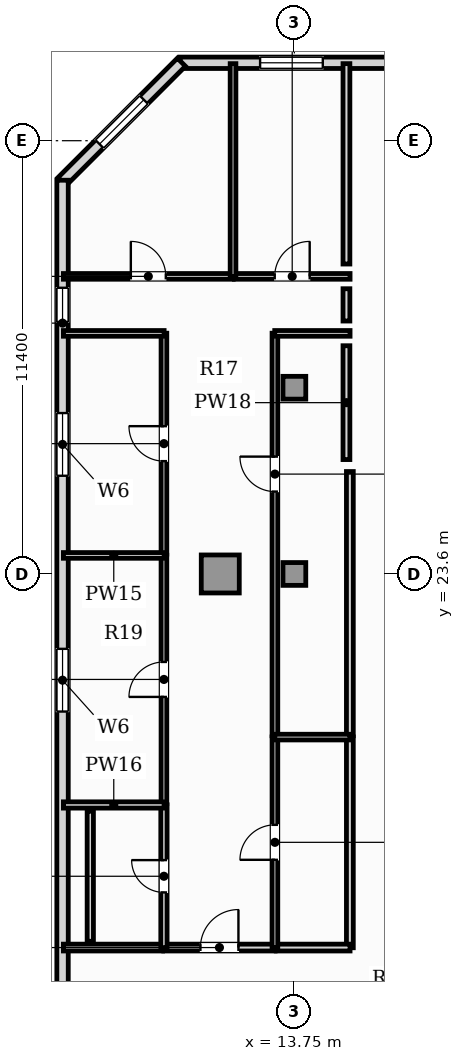
"""IFC4 building model, lengths in metres.
Left out: names, types, materials, properties, quantities, classifications, styles, units other than length and angle.
Written with IfcOpenShell. Run it as: python <this file> out.ifc"""

import sys

from ifc_helpers import new_model, si_unit, direction, frame, frame_2d, origin, origin_2d, place, context, subcontext, project, spatial, rectangle, hollow_rectangle, extrude, element, fill, save


model = new_model("IFC4")
c1 = context("Model", 3, precision=1e-05, world=origin(), true_north=direction((0.0, 1.0)))
c2 = subcontext(c1, "Body", "Model", "MODEL_VIEW")
j1 = project(units=[si_unit("LENGTHUNIT", "METRE"), si_unit("PLANEANGLEUNIT", "RADIAN")], contexts=[c1])
p1 = place(None, origin())
s1 = spatial("IfcSite", under=j1, at=p1, CompositionType="ELEMENT")
p2 = place(p1, origin())
s2 = spatial("IfcBuilding", under=s1, at=p2, CompositionType="ELEMENT")
p3 = place(p2, frame((0.0, 0.0, 231.1)))
s3 = spatial("IfcBuildingStorey", under=s2, at=p3, CompositionType="ELEMENT", Elevation=231.1)
p4 = place(p3, frame((11.8, 23.6, 0.0), z_axis=(0.0, 0.0, 1.0), x_axis=(1.0, 0.0, 0.0)))
e1 = element("IfcColumn", 1, at=p4, inside=s3, PredefinedType="USERDEFINED", context=c2, shape_type="SweptSolid", body=[
    extrude(hollow_rectangle(XDim=1.0, YDim=1.0, WallThickness=0.06, at=origin_2d()), origin(), (0.0, 0.0, 1.0), 3.85),
])
for number, where, z_axis, x_axis in (
    (2, (13.75, 23.6, 0.0), (0.0, 0.0, 1.0), (1.0, 0.0, 0.0)),
    (3, (13.75, 28.5, 0.0), (0.0, 0.0, 1.0), (1.0, 0.0, 0.0)),
):
    element("IfcColumn", number, at=place(p3, frame(where, z_axis=z_axis, x_axis=x_axis)), inside=s3, PredefinedType="COLUMN", context=c2, shape_type="SweptSolid", body=[
        extrude(rectangle(XDim=0.6, YDim=0.6, at=origin_2d()), origin(), (0.0, 0.0, 1.0), 3.85),
    ])
p5 = place(p3, frame((46.76, 37.05, 0.0), z_axis=(0.0, 0.0, 1.0), x_axis=(-1.0, 0.0, 0.0)))
e4 = element("IfcWall", 4, at=p5, inside=s3, PredefinedType="SOLIDWALL", context=c2, shape_type="SweptSolid", body=[
    extrude(rectangle(XDim=36.02, YDim=0.3, at=frame_2d((18.01, 0.0))), origin(), (0.0, 0.0, 1.0), 3.63),
])
p6 = place(p5, frame((32.262, 0.0, 0.88)))
e5 = element("IfcOpeningElement", 5, at=p6, cuts=e4, PredefinedType="OPENING", context=c2, shape_type="SweptSolid", body=[
    extrude(rectangle(XDim=1.65, YDim=2.0, at=frame_2d((0.825, 1.0))), frame((0.0, 0.16, 0.0), z_axis=(0.0, -1.0, 0.0), x_axis=(1.0, 0.0, 0.0)), (0.0, 0.0, 1.0), 0.32),
])
p7 = place(p5, frame((23.355, 0.0, 0.88)))
e6 = element("IfcOpeningElement", 6, at=p7, cuts=e4, PredefinedType="OPENING", context=c2, shape_type="SweptSolid", body=[
    extrude(rectangle(XDim=1.65, YDim=2.0, at=frame_2d((0.825, 1.0))), frame((0.0, 0.16, 0.0), z_axis=(0.0, -1.0, 0.0), x_axis=(1.0, 0.0, 0.0)), (0.0, 0.0, 1.0), 0.32),
])
p8 = place(p5, frame((17.903, 0.0, 0.88)))
e7 = element("IfcOpeningElement", 7, at=p8, cuts=e4, PredefinedType="OPENING", context=c2, shape_type="SweptSolid", body=[
    extrude(rectangle(XDim=1.65, YDim=2.0, at=frame_2d((0.825, 1.0))), frame((0.0, 0.16, 0.0), z_axis=(0.0, -1.0, 0.0), x_axis=(1.0, 0.0, 0.0)), (0.0, 0.0, 1.0), 0.32),
])
p9 = place(p5, frame((12.281, 0.0, 0.88)))
e8 = element("IfcOpeningElement", 8, at=p9, cuts=e4, PredefinedType="OPENING", context=c2, shape_type="SweptSolid", body=[
    extrude(rectangle(XDim=1.65, YDim=2.0, at=frame_2d((0.825, 1.0))), frame((0.0, 0.16, 0.0), z_axis=(0.0, -1.0, 0.0), x_axis=(1.0, 0.0, 0.0)), (0.0, 0.0, 1.0), 0.32),
])
p10 = place(p5, frame((6.464, 0.0, 0.88)))
e9 = element("IfcOpeningElement", 9, at=p10, cuts=e4, PredefinedType="OPENING", context=c2, shape_type="SweptSolid", body=[
    extrude(rectangle(XDim=1.65, YDim=2.0, at=frame_2d((0.825, 1.0))), frame((0.0, 0.16, 0.0), z_axis=(0.0, -1.0, 0.0), x_axis=(1.0, 0.0, 0.0)), (0.0, 0.0, 1.0), 0.32),
])
p11 = place(p3, frame((10.778, 37.066, 0.0), z_axis=(0.0, 0.0, 1.0), x_axis=(-0.707079321262, -0.707134240044, 0.0)))
e10 = element("IfcWall", 10, at=p11, inside=s3, PredefinedType="SOLIDWALL", context=c2, shape_type="SweptSolid", body=[
    extrude(rectangle(XDim=4.446, YDim=0.3, at=frame_2d((2.223, 0.0))), origin(), (0.0, 0.0, 1.0), 3.63),
])
p12 = place(p11, frame((1.398, 0.0, 0.88)))
e11 = element("IfcOpeningElement", 11, at=p12, cuts=e10, PredefinedType="OPENING", context=c2, shape_type="SweptSolid", body=[
    extrude(rectangle(XDim=1.65, YDim=2.0, at=frame_2d((0.825, 1.0))), frame((0.0, 0.16, 0.0), z_axis=(0.0, -1.0, 0.0), x_axis=(1.0, 0.0, 0.0)), (0.0, 0.0, 1.0), 0.32),
])
p13 = place(p3, frame((7.65, 33.96, 0.0), z_axis=(0.0, 0.0, 1.0), x_axis=(0.0, -1.0, 0.0)))
e12 = element("IfcWall", 12, at=p13, inside=s3, PredefinedType="SOLIDWALL", context=c2, shape_type="SweptSolid", body=[
    extrude(rectangle(XDim=30.72, YDim=0.3, at=frame_2d((15.36, 0.0))), origin(), (0.0, 0.0, 1.0), 3.63),
])
p14 = place(p13, frame((2.83, 0.0, 0.95)))
e13 = element("IfcOpeningElement", 13, at=p14, cuts=e12, PredefinedType="OPENING", context=c2, shape_type="SweptSolid", body=[
    extrude(rectangle(XDim=0.9, YDim=1.5, at=frame_2d((0.45, 0.75))), frame((0.0, 0.16, 0.0), z_axis=(0.0, -1.0, 0.0), x_axis=(1.0, 0.0, 0.0)), (0.0, 0.0, 1.0), 0.32),
])
p15 = place(p13, frame((12.33, 0.0, 0.88)))
e14 = element("IfcOpeningElement", 14, at=p15, cuts=e12, PredefinedType="OPENING", context=c2, shape_type="SweptSolid", body=[
    extrude(rectangle(XDim=1.65, YDim=2.0, at=frame_2d((0.825, 1.0))), frame((0.0, 0.16, 0.0), z_axis=(0.0, -1.0, 0.0), x_axis=(1.0, 0.0, 0.0)), (0.0, 0.0, 1.0), 0.32),
])
p16 = place(p13, frame((6.126, 0.0, 0.88)))
e15 = element("IfcOpeningElement", 15, at=p16, cuts=e12, PredefinedType="OPENING", context=c2, shape_type="SweptSolid", body=[
    extrude(rectangle(XDim=1.65, YDim=2.0, at=frame_2d((0.825, 1.0))), frame((0.0, 0.16, 0.0), z_axis=(0.0, -1.0, 0.0), x_axis=(1.0, 0.0, 0.0)), (0.0, 0.0, 1.0), 0.32),
])
p17 = place(p3, frame((10.313, 13.77, 0.0), z_axis=(0.0, 0.0, 1.0), x_axis=(1.0, 0.0, 0.0)))
e16 = element("IfcWall", 16, at=p17, inside=s3, PredefinedType="PARTITIONING", context=c2, shape_type="SweptSolid", body=[
    extrude(rectangle(XDim=2.93, YDim=0.18, at=frame_2d((1.465, 0.0))), origin(), (0.0, 0.0, 1.0), 3.63),
])
p18 = place(p17, frame((0.965, 0.0, 0.0)))
e17 = element("IfcOpeningElement", 17, at=p18, cuts=e16, PredefinedType="OPENING", context=c2, shape_type="SweptSolid", body=[
    extrude(rectangle(XDim=1.0, YDim=2.15, at=frame_2d((0.5, 1.075))), frame((0.0, 0.1, 0.0), z_axis=(0.0, -1.0, 0.0), x_axis=(1.0, 0.0, 0.0)), (0.0, 0.0, 1.0), 0.2),
])
p19 = place(p3, frame((7.673, 13.77, 0.0), z_axis=(0.0, 0.0, 1.0), x_axis=(1.0, 0.0, 0.0)))
e18 = element("IfcWall", 18, at=p19, inside=s3, PredefinedType="PARTITIONING", context=c2, shape_type="SweptSolid", body=[
    extrude(rectangle(XDim=2.61, YDim=0.18, at=frame_2d((1.305, 0.0))), origin(), (0.0, 0.0, 1.0), 3.63),
])
p20 = place(p3, frame((15.21, 13.765, 0.0), z_axis=(0.0, 0.0, 1.0), x_axis=(0.0, 1.0, 0.0)))
e19 = element("IfcWall", 19, at=p20, inside=s3, PredefinedType="PARTITIONING", context=c2, shape_type="SweptSolid", body=[
    extrude(rectangle(XDim=5.548, YDim=0.18, at=frame_2d((2.774, 0.0))), origin(), (0.0, 0.0, 1.0), 3.63),
])
p21 = place(p3, frame((13.273, 13.77, 0.0), z_axis=(0.0, 0.0, 1.0), x_axis=(1.0, 0.0, 0.0)))
e20 = element("IfcWall", 20, at=p21, inside=s3, PredefinedType="PARTITIONING", context=c2, shape_type="SweptSolid", body=[
    extrude(rectangle(XDim=1.942, YDim=0.18, at=frame_2d((0.971, 0.0))), origin(), (0.0, 0.0, 1.0), 3.63),
])
p22 = place(p3, frame((15.21, 19.343, 0.0), z_axis=(0.0, 0.0, 1.0), x_axis=(0.0, 1.0, 0.0)))
e21 = element("IfcWall", 21, at=p22, inside=s3, PredefinedType="PARTITIONING", context=c2, shape_type="SweptSolid", body=[
    extrude(rectangle(XDim=6.952, YDim=0.18, at=frame_2d((3.476, 0.0))), origin(), (0.0, 0.0, 1.0), 3.63),
])
p23 = place(p3, frame((10.318, 13.765, 0.0), z_axis=(0.0, 0.0, 1.0), x_axis=(0.0, 1.0, 0.0)))
e22 = element("IfcWall", 22, at=p23, inside=s3, PredefinedType="PLUMBINGWALL", context=c2, shape_type="SweptSolid", body=[
    extrude(rectangle(XDim=3.762, YDim=0.165, at=frame_2d((1.881, 0.0))), origin(), (0.0, 0.0, 1.0), 3.63),
])
p24 = place(p23, frame((1.456, 0.0, 0.0)))
e23 = element("IfcOpeningElement", 23, at=p24, cuts=e22, PredefinedType="OPENING", context=c2, shape_type="SweptSolid", body=[
    extrude(rectangle(XDim=0.85, YDim=2.1, at=frame_2d((0.425, 1.05))), frame((0.0, 0.093, 0.0), z_axis=(0.0, -1.0, 0.0), x_axis=(1.0, 0.0, 0.0)), (0.0, 0.0, 1.0), 0.185),
])
p25 = place(p3, frame((10.318, 17.557, 0.0), z_axis=(0.0, 0.0, 1.0), x_axis=(0.0, 1.0, 0.0)))
e24 = element("IfcWall", 24, at=p25, inside=s3, PredefinedType="PARTITIONING", context=c2, shape_type="SweptSolid", body=[
    extrude(rectangle(XDim=6.536, YDim=0.15, at=frame_2d((3.268, 0.0))), origin(), (0.0, 0.0, 1.0), 3.63),
])
p26 = place(p25, frame((2.808, 0.0, 0.0)))
e25 = element("IfcOpeningElement", 25, at=p26, cuts=e24, PredefinedType="OPENING", context=c2, shape_type="SweptSolid", body=[
    extrude(rectangle(XDim=0.92, YDim=2.1, at=frame_2d((0.46, 1.05))), frame((0.0, 0.085, 0.0), z_axis=(0.0, -1.0, 0.0), x_axis=(1.0, 0.0, 0.0)), (0.0, 0.0, 1.0), 0.17),
])
p27 = place(p3, frame((10.318, 24.123, 0.0), z_axis=(0.0, 0.0, 1.0), x_axis=(0.0, 1.0, 0.0)))
e26 = element("IfcWall", 26, at=p27, inside=s3, PredefinedType="PARTITIONING", context=c2, shape_type="SweptSolid", body=[
    extrude(rectangle(XDim=5.812, YDim=0.15, at=frame_2d((2.906, 0.0))), origin(), (0.0, 0.0, 1.0), 3.63),
])
p28 = place(p27, frame((2.446, 0.0, 0.0)))
e27 = element("IfcOpeningElement", 27, at=p28, cuts=e26, PredefinedType="OPENING", context=c2, shape_type="SweptSolid", body=[
    extrude(rectangle(XDim=0.92, YDim=2.1, at=frame_2d((0.46, 1.05))), frame((0.0, 0.085, 0.0), z_axis=(0.0, -1.0, 0.0), x_axis=(1.0, 0.0, 0.0)), (0.0, 0.0, 1.0), 0.17),
])
p29 = place(p3, frame((7.673, 29.93, 0.0), z_axis=(0.0, 0.0, 1.0), x_axis=(1.0, 0.0, 0.0)))
e28 = element("IfcWall", 28, at=p29, inside=s3, PredefinedType="PARTITIONING", context=c2, shape_type="SweptSolid", body=[
    extrude(rectangle(XDim=2.65, YDim=0.15, at=frame_2d((1.325, 0.0))), origin(), (0.0, 0.0, 1.0), 3.63),
])
p30 = place(p3, frame((13.238, 13.765, 0.0), z_axis=(0.0, 0.0, 1.0), x_axis=(0.0, 1.0, 0.0)))
e29 = element("IfcWall", 29, at=p30, inside=s3, PredefinedType="PARTITIONING", context=c2, shape_type="SweptSolid", body=[
    extrude(rectangle(XDim=5.548, YDim=0.15, at=frame_2d((2.774, 0.0))), origin(), (0.0, 0.0, 1.0), 3.63),
])
p31 = place(p30, frame((2.314, 0.0, 0.0)))
e30 = element("IfcOpeningElement", 30, at=p31, cuts=e29, PredefinedType="OPENING", context=c2, shape_type="SweptSolid", body=[
    extrude(rectangle(XDim=0.92, YDim=2.1, at=frame_2d((0.46, 1.05))), frame((0.0, 0.085, 0.0), z_axis=(0.0, -1.0, 0.0), x_axis=(1.0, 0.0, 0.0)), (0.0, 0.0, 1.0), 0.17),
])
p32 = place(p3, frame((13.238, 19.343, 0.0), z_axis=(0.0, 0.0, 1.0), x_axis=(0.0, 1.0, 0.0)))
e31 = element("IfcWall", 31, at=p32, inside=s3, PredefinedType="PARTITIONING", context=c2, shape_type="SweptSolid", body=[
    extrude(rectangle(XDim=10.592, YDim=0.15, at=frame_2d((5.296, 0.0))), origin(), (0.0, 0.0, 1.0), 3.63),
])
p33 = place(p32, frame((6.425, 0.0, 0.0)))
e32 = element("IfcOpeningElement", 32, at=p33, cuts=e31, PredefinedType="OPENING", context=c2, shape_type="SweptSolid", body=[
    extrude(rectangle(XDim=0.92, YDim=2.1, at=frame_2d((0.46, 1.05))), frame((0.0, 0.085, 0.0), z_axis=(0.0, -1.0, 0.0), x_axis=(1.0, 0.0, 0.0)), (0.0, 0.0, 1.0), 0.17),
])
p34 = place(p3, frame((13.233, 29.93, 0.0), z_axis=(0.0, 0.0, 1.0), x_axis=(1.0, 0.0, 0.0)))
e33 = element("IfcWall", 33, at=p34, inside=s3, PredefinedType="PARTITIONING", context=c2, shape_type="SweptSolid", body=[
    extrude(rectangle(XDim=1.982, YDim=0.15, at=frame_2d((0.991, 0.0))), origin(), (0.0, 0.0, 1.0), 3.63),
])
p35 = place(p3, frame((7.673, 31.43, 0.0), z_axis=(0.0, 0.0, 1.0), x_axis=(1.0, 0.0, 0.0)))
e34 = element("IfcWall", 34, at=p35, inside=s3, PredefinedType="PARTITIONING", context=c2, shape_type="SweptSolid", body=[
    extrude(rectangle(XDim=4.468, YDim=0.15, at=frame_2d((2.234, 0.0))), origin(), (0.0, 0.0, 1.0), 3.63),
])
p36 = place(p35, frame((1.774, 0.0, 0.0)))
e35 = element("IfcOpeningElement", 35, at=p36, cuts=e34, PredefinedType="OPENING", context=c2, shape_type="SweptSolid", body=[
    extrude(rectangle(XDim=0.92, YDim=2.1, at=frame_2d((0.46, 1.05))), frame((0.0, 0.085, 0.0), z_axis=(0.0, -1.0, 0.0), x_axis=(1.0, 0.0, 0.0)), (0.0, 0.0, 1.0), 0.17),
])
p37 = place(p3, frame((12.171, 31.43, 0.0), z_axis=(0.0, 0.0, 1.0), x_axis=(1.0, 0.0, 0.0)))
e36 = element("IfcWall", 36, at=p37, inside=s3, PredefinedType="PARTITIONING", context=c2, shape_type="SweptSolid", body=[
    extrude(rectangle(XDim=3.044, YDim=0.15, at=frame_2d((1.522, 0.0))), origin(), (0.0, 0.0, 1.0), 3.63),
])
p38 = place(p37, frame((1.062, 0.0, 0.0)))
e37 = element("IfcOpeningElement", 37, at=p38, cuts=e36, PredefinedType="OPENING", context=c2, shape_type="SweptSolid", body=[
    extrude(rectangle(XDim=0.92, YDim=2.1, at=frame_2d((0.46, 1.05))), frame((0.0, 0.085, 0.0), z_axis=(0.0, -1.0, 0.0), x_axis=(1.0, 0.0, 0.0)), (0.0, 0.0, 1.0), 0.17),
])
p39 = place(p3, frame((7.673, 17.522, 0.0), z_axis=(0.0, 0.0, 1.0), x_axis=(1.0, 0.0, 0.0)))
e38 = element("IfcWall", 38, at=p39, inside=s3, PredefinedType="PLUMBINGWALL", context=c2, shape_type="SweptSolid", body=[
    extrude(rectangle(XDim=2.65, YDim=0.165, at=frame_2d((1.325, 0.0))), origin(), (0.0, 0.0, 1.0), 3.63),
])
p40 = place(p3, frame((7.673, 24.088, 0.0), z_axis=(0.0, 0.0, 1.0), x_axis=(1.0, 0.0, 0.0)))
e39 = element("IfcWall", 39, at=p40, inside=s3, PredefinedType="PARTITIONING", context=c2, shape_type="SweptSolid", body=[
    extrude(rectangle(XDim=2.65, YDim=0.15, at=frame_2d((1.325, 0.0))), origin(), (0.0, 0.0, 1.0), 3.63),
])
p41 = place(p3, frame((13.233, 19.308, 0.0), z_axis=(0.0, 0.0, 1.0), x_axis=(1.0, 0.0, 0.0)))
e40 = element("IfcWall", 40, at=p41, inside=s3, PredefinedType="PARTITIONING", context=c2, shape_type="SweptSolid", body=[
    extrude(rectangle(XDim=1.982, YDim=0.15, at=frame_2d((0.991, 0.0))), origin(), (0.0, 0.0, 1.0), 3.63),
])
p42 = place(p3, frame((12.136, 31.425, 0.0), z_axis=(0.0, 0.0, 1.0), x_axis=(0.0, 1.0, 0.0)))
e41 = element("IfcWall", 41, at=p42, inside=s3, PredefinedType="PARTITIONING", context=c2, shape_type="SweptSolid", body=[
    extrude(rectangle(XDim=5.603, YDim=0.15, at=frame_2d((2.801, 0.0))), origin(), (0.0, 0.0, 1.0), 3.63),
])
p43 = place(p3, frame((15.12, 31.105, 0.0), z_axis=(0.0, 0.0, 1.0), x_axis=(0.0, -1.0, 0.0)))
e42 = element("IfcWall", 42, at=p43, inside=s3, PredefinedType="PARTITIONING", context=c2, shape_type="SweptSolid", body=[
    extrude(rectangle(XDim=0.85, YDim=0.18, at=frame_2d((0.425, 0.0))), origin(), (0.0, 0.0, 1.0), 3.63),
])
p44 = place(p3, frame((8.38, 13.935, 0.0), z_axis=(0.0, 0.0, 1.0), x_axis=(0.0, 1.0, 0.0)))
e43 = element("IfcWall", 43, at=p44, inside=s3, PredefinedType="PLUMBINGWALL", context=c2, shape_type="SweptSolid", body=[
    extrude(rectangle(XDim=3.422, YDim=0.165, at=frame_2d((1.711, 0.0))), origin(), (0.0, 0.0, 1.0), 3.63),
])
p45 = place(p3, frame((15.12, 29.605, 0.0), z_axis=(0.0, 0.0, 1.0), x_axis=(0.0, -1.0, 0.0)))
e44 = element("IfcWall", 44, at=p45, inside=s3, PredefinedType="PARTITIONING", context=c2, shape_type="SweptSolid", body=[
    extrude(rectangle(XDim=2.995, YDim=0.18, at=frame_2d((1.498, 0.0))), origin(), (0.0, 0.0, 1.0), 3.63),
])
p46 = place(p3, frame((15.12, 37.028, 0.0), z_axis=(0.0, 0.0, 1.0), x_axis=(0.0, -1.0, 0.0)))
e45 = element("IfcWall", 45, at=p46, inside=s3, PredefinedType="PARTITIONING", context=c2, shape_type="SweptSolid", body=[
    extrude(rectangle(XDim=5.273, YDim=0.18, at=frame_2d((2.636, 0.0))), origin(), (0.0, 0.0, 1.0), 3.63),
])
p47 = place(p14, origin())
e46 = element("IfcWindow", 46, at=p47, inside=s3, PartitioningType="SINGLE_PANEL", PredefinedType="WINDOW", context=c2, shape_type="SweptSolid", body=[
    extrude(rectangle(XDim=0.9, YDim=1.5, at=frame_2d((0.45, 0.75))), frame((0.0, 0.03, 0.0), z_axis=(0.0, -1.0, 0.0), x_axis=(1.0, 0.0, 0.0)), (0.0, 0.0, 1.0), 0.06),
])
fill(e13, e46)
p48 = place(p15, origin())
e47 = element("IfcWindow", 47, at=p48, inside=s3, PartitioningType="SINGLE_PANEL", PredefinedType="WINDOW", context=c2, shape_type="SweptSolid", body=[
    extrude(rectangle(XDim=1.65, YDim=2.0, at=frame_2d((0.825, 1.0))), frame((0.0, 0.03, 0.0), z_axis=(0.0, -1.0, 0.0), x_axis=(1.0, 0.0, 0.0)), (0.0, 0.0, 1.0), 0.06),
])
fill(e14, e47)
p49 = place(p16, origin())
e48 = element("IfcWindow", 48, at=p49, inside=s3, PartitioningType="SINGLE_PANEL", PredefinedType="WINDOW", context=c2, shape_type="SweptSolid", body=[
    extrude(rectangle(XDim=1.65, YDim=2.0, at=frame_2d((0.825, 1.0))), frame((0.0, 0.03, 0.0), z_axis=(0.0, -1.0, 0.0), x_axis=(1.0, 0.0, 0.0)), (0.0, 0.0, 1.0), 0.06),
])
fill(e15, e48)
p50 = place(p12, origin())
e49 = element("IfcWindow", 49, at=p50, inside=s3, PartitioningType="SINGLE_PANEL", PredefinedType="WINDOW", context=c2, shape_type="SweptSolid", body=[
    extrude(rectangle(XDim=1.65, YDim=2.0, at=frame_2d((0.825, 1.0))), frame((0.0, 0.03, 0.0), z_axis=(0.0, -1.0, 0.0), x_axis=(1.0, 0.0, 0.0)), (0.0, 0.0, 1.0), 0.06),
])
fill(e11, e49)
p51 = place(p6, origin())
e50 = element("IfcWindow", 50, at=p51, inside=s3, PartitioningType="SINGLE_PANEL", PredefinedType="WINDOW", context=c2, shape_type="SweptSolid", body=[
    extrude(rectangle(XDim=1.65, YDim=2.0, at=frame_2d((0.825, 1.0))), frame((0.0, 0.03, 0.0), z_axis=(0.0, -1.0, 0.0), x_axis=(1.0, 0.0, 0.0)), (0.0, 0.0, 1.0), 0.06),
])
fill(e5, e50)
p52 = place(p18, origin())
e51 = element("IfcDoor", 51, at=p52, inside=s3, OperationType="SINGLE_SWING_RIGHT", PredefinedType="DOOR", context=c2, shape_type="SweptSolid", body=[
    extrude(rectangle(XDim=1.0, YDim=2.15, at=frame_2d((0.5, 1.075))), frame((0.0, 0.025, 0.0), z_axis=(0.0, -1.0, 0.0), x_axis=(1.0, 0.0, 0.0)), (0.0, 0.0, 1.0), 0.05),
])
fill(e17, e51)
p53 = place(p24, origin())
e52 = element("IfcDoor", 52, at=p53, inside=s3, OperationType="SINGLE_SWING_RIGHT", PredefinedType="DOOR", context=c2, shape_type="SweptSolid", body=[
    extrude(rectangle(XDim=0.85, YDim=2.1, at=frame_2d((0.425, 1.05))), frame((0.0, 0.025, 0.0), z_axis=(0.0, -1.0, 0.0), x_axis=(1.0, 0.0, 0.0)), (0.0, 0.0, 1.0), 0.05),
])
fill(e23, e52)
p54 = place(p26, origin())
e53 = element("IfcDoor", 53, at=p54, inside=s3, OperationType="SINGLE_SWING_LEFT", PredefinedType="DOOR", context=c2, shape_type="SweptSolid", body=[
    extrude(rectangle(XDim=0.92, YDim=2.1, at=frame_2d((0.46, 1.05))), frame((0.0, 0.025, 0.0), z_axis=(0.0, -1.0, 0.0), x_axis=(1.0, 0.0, 0.0)), (0.0, 0.0, 1.0), 0.05),
])
fill(e25, e53)
p55 = place(p28, origin())
e54 = element("IfcDoor", 54, at=p55, inside=s3, OperationType="SINGLE_SWING_RIGHT", PredefinedType="DOOR", context=c2, shape_type="SweptSolid", body=[
    extrude(rectangle(XDim=0.92, YDim=2.1, at=frame_2d((0.46, 1.05))), frame((0.0, 0.025, 0.0), z_axis=(0.0, -1.0, 0.0), x_axis=(1.0, 0.0, 0.0)), (0.0, 0.0, 1.0), 0.05),
])
fill(e27, e54)
p56 = place(p31, origin())
e55 = element("IfcDoor", 55, at=p56, inside=s3, OperationType="SINGLE_SWING_LEFT", PredefinedType="DOOR", context=c2, shape_type="SweptSolid", body=[
    extrude(rectangle(XDim=0.92, YDim=2.1, at=frame_2d((0.46, 1.05))), frame((0.0, 0.025, 0.0), z_axis=(0.0, -1.0, 0.0), x_axis=(1.0, 0.0, 0.0)), (0.0, 0.0, 1.0), 0.05),
])
fill(e30, e55)
p57 = place(p33, origin())
e56 = element("IfcDoor", 56, at=p57, inside=s3, OperationType="SINGLE_SWING_RIGHT", PredefinedType="DOOR", context=c2, shape_type="SweptSolid", body=[
    extrude(rectangle(XDim=0.92, YDim=2.1, at=frame_2d((0.46, 1.05))), frame((0.0, 0.025, 0.0), z_axis=(0.0, -1.0, 0.0), x_axis=(1.0, 0.0, 0.0)), (0.0, 0.0, 1.0), 0.05),
])
fill(e32, e56)
p58 = place(p36, origin())
e57 = element("IfcDoor", 57, at=p58, inside=s3, OperationType="SINGLE_SWING_LEFT", PredefinedType="DOOR", context=c2, shape_type="SweptSolid", body=[
    extrude(rectangle(XDim=0.92, YDim=2.1, at=frame_2d((0.46, 1.05))), frame((0.0, 0.025, 0.0), z_axis=(0.0, -1.0, 0.0), x_axis=(1.0, 0.0, 0.0)), (0.0, 0.0, 1.0), 0.05),
])
fill(e35, e57)
p59 = place(p38, origin())
e58 = element("IfcDoor", 58, at=p59, inside=s3, OperationType="SINGLE_SWING_RIGHT", PredefinedType="DOOR", context=c2, shape_type="SweptSolid", body=[
    extrude(rectangle(XDim=0.92, YDim=2.1, at=frame_2d((0.46, 1.05))), frame((0.0, 0.025, 0.0), z_axis=(0.0, -1.0, 0.0), x_axis=(1.0, 0.0, 0.0)), (0.0, 0.0, 1.0), 0.05),
])
fill(e37, e58)
save(model, sys.argv[1])
